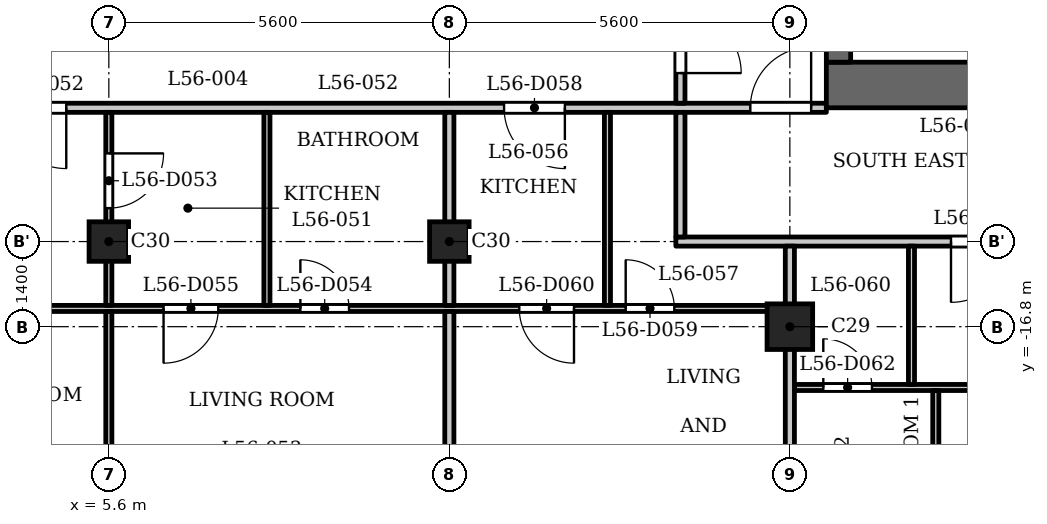
"""IFC4 building model, lengths in metres.
Left out: names, types, materials, properties, quantities, classifications, styles, units other than length and angle.
Written with IfcOpenShell. Run it as: python <this file> out.ifc"""

import sys

from ifc_helpers import new_model, si_unit, direction, frame, frame_2d, origin, origin_2d, place, context, subcontext, project, spatial, rectangle, extrude, element, fill, save


model = new_model("IFC4")
c1 = context("Model", 3, precision=1e-05, world=origin(), true_north=direction((0.0, 1.0)))
c2 = subcontext(c1, "Body", "Model", "MODEL_VIEW")
j1 = project(units=[si_unit("LENGTHUNIT", "METRE"), si_unit("PLANEANGLEUNIT", "RADIAN")], contexts=[c1])
p1 = place(None, origin())
s1 = spatial("IfcSite", under=j1, at=p1, CompositionType="ELEMENT")
p2 = place(p1, origin())
s2 = spatial("IfcBuilding", under=s1, at=p2, CompositionType="ELEMENT")
p3 = place(p2, frame((0.0, 0.0, 216.9)))
s3 = spatial("IfcBuildingStorey", under=s2, at=p3, CompositionType="ELEMENT", Elevation=216.9)
p4 = place(p3, frame((16.8, -16.8, 0.0), z_axis=(0.0, 0.0, 1.0), x_axis=(1.0, 0.0, 0.0)))
e1 = element("IfcColumn", 1, at=p4, inside=s3, PredefinedType="COLUMN", context=c2, shape_type="SweptSolid", body=[
    extrude(rectangle(XDim=0.75, YDim=0.75, at=origin_2d()), origin(), (0.0, 0.0, 1.0), 3.5),
])
for number, where, z_axis, x_axis in (
    (2, (5.6, -15.4, 0.0), (0.0, 0.0, 1.0), (1.0, 0.0, 0.0)),
    (3, (11.2, -15.4, 0.0), (0.0, 0.0, 1.0), (1.0, 0.0, 0.0)),
):
    element("IfcColumn", number, at=place(p3, frame(where, z_axis=z_axis, x_axis=x_axis)), inside=s3, PredefinedType="COLUMN", context=c2, shape_type="SweptSolid", body=[
        extrude(rectangle(XDim=0.65, YDim=0.65, at=origin_2d()), origin(), (0.0, 0.0, 1.0), 3.5),
    ])
p5 = place(p3, frame((17.4, -12.825, 0.0), z_axis=(0.0, 0.0, 1.0), x_axis=(1.0, 0.0, 0.0)))
e4 = element("IfcWall", 4, at=p5, inside=s3, PredefinedType="SHEAR", context=c2, shape_type="SweptSolid", body=[
    extrude(rectangle(XDim=7.6, YDim=0.75, at=frame_2d((3.8, 0.0))), origin(), (0.0, 0.0, 1.0), 3.2),
])
p6 = place(p3, frame((17.6, -12.45, 0.0), z_axis=(0.0, 0.0, 1.0), x_axis=(0.0, 1.0, 0.0)))
e5 = element("IfcWall", 5, at=p6, inside=s3, PredefinedType="SHEAR", context=c2, shape_type="SweptSolid", body=[
    extrude(rectangle(XDim=24.9, YDim=0.4, at=frame_2d((12.45, 0.0))), origin(), (0.0, 0.0, 1.0), 3.2),
])
p7 = place(p6, frame((6.85, 0.0, 0.0)))
e6 = element("IfcOpeningElement", 6, at=p7, cuts=e5, PredefinedType="OPENING", context=c2, shape_type="SweptSolid", body=[
    extrude(rectangle(XDim=0.9, YDim=2.1, at=frame_2d((0.45, 1.05))), frame((0.0, 0.21, 0.0), z_axis=(0.0, -1.0, 0.0), x_axis=(1.0, 0.0, 0.0)), (0.0, 0.0, 1.0), 0.42),
])
p8 = place(p6, frame((10.45, 0.0, 0.0)))
e7 = element("IfcOpeningElement", 7, at=p8, cuts=e5, PredefinedType="OPENING", context=c2, shape_type="SweptSolid", body=[
    extrude(rectangle(XDim=0.9, YDim=2.1, at=frame_2d((0.45, 1.05))), frame((0.0, 0.21, 0.0), z_axis=(0.0, -1.0, 0.0), x_axis=(1.0, 0.0, 0.0)), (0.0, 0.0, 1.0), 0.42),
])
p9 = place(p6, frame((15.6, 0.0, 0.0)))
e8 = element("IfcOpeningElement", 8, at=p9, cuts=e5, PredefinedType="OPENING", context=c2, shape_type="SweptSolid", body=[
    extrude(rectangle(XDim=1.1, YDim=2.1, at=frame_2d((0.55, 1.05))), frame((0.0, 0.21, 0.0), z_axis=(0.0, -1.0, 0.0), x_axis=(1.0, 0.0, 0.0)), (0.0, 0.0, 1.0), 0.42),
])
p10 = place(p6, frame((18.0, 0.0, 0.0)))
e9 = element("IfcOpeningElement", 9, at=p10, cuts=e5, PredefinedType="OPENING", context=c2, shape_type="SweptSolid", body=[
    extrude(rectangle(XDim=1.1, YDim=2.1, at=frame_2d((0.55, 1.05))), frame((0.0, 0.21, 0.0), z_axis=(0.0, -1.0, 0.0), x_axis=(1.0, 0.0, 0.0)), (0.0, 0.0, 1.0), 0.42),
])
p11 = place(p6, frame((23.025, 0.0, 0.0)))
e10 = element("IfcOpeningElement", 10, at=p11, cuts=e5, PredefinedType="OPENING", context=c2, shape_type="SweptSolid", body=[
    extrude(rectangle(XDim=1.1, YDim=2.1, at=frame_2d((0.55, 1.05))), frame((0.0, 0.21, 0.0), z_axis=(0.0, -1.0, 0.0), x_axis=(1.0, 0.0, 0.0)), (0.0, 0.0, 1.0), 0.42),
])
p12 = place(p6, frame((0.775, 0.0, 0.0)))
e11 = element("IfcOpeningElement", 11, at=p12, cuts=e5, PredefinedType="OPENING", context=c2, shape_type="SweptSolid", body=[
    extrude(rectangle(XDim=1.1, YDim=2.1, at=frame_2d((0.55, 1.05))), frame((0.0, 0.21, 0.0), z_axis=(0.0, -1.0, 0.0), x_axis=(1.0, 0.0, 0.0)), (0.0, 0.0, 1.0), 0.42),
])
p13 = place(p6, frame((12.925, 0.0, 0.0)))
e12 = element("IfcOpeningElement", 12, at=p13, cuts=e5, PredefinedType="OPENING", context=c2, shape_type="SweptSolid", body=[
    extrude(rectangle(XDim=1.8, YDim=2.1, at=frame_2d((0.9, 1.05))), frame((0.0, 0.21, 0.0), z_axis=(0.0, -1.0, 0.0), x_axis=(1.0, 0.0, 0.0)), (0.0, 0.0, 1.0), 0.42),
])
p14 = place(p3, frame((16.875, -17.8, 0.0), z_axis=(0.0, 0.0, 1.0), x_axis=(1.0, 0.0, 0.0)))
e13 = element("IfcWall", 13, at=p14, inside=s3, PredefinedType="PARTITIONING", context=c2, shape_type="SweptSolid", body=[
    extrude(rectangle(XDim=6.719, YDim=0.1, at=frame_2d((3.359, 0.0))), origin(), (0.0, 0.0, 1.0), 3.2),
])
p15 = place(p14, frame((0.475, 0.0, 0.0)))
e14 = element("IfcOpeningElement", 14, at=p15, cuts=e13, PredefinedType="OPENING", context=c2, shape_type="SweptSolid", body=[
    extrude(rectangle(XDim=0.8, YDim=2.1, at=frame_2d((0.4, 1.05))), frame((0.0, 0.06, 0.0), z_axis=(0.0, -1.0, 0.0), x_axis=(1.0, 0.0, 0.0)), (0.0, 0.0, 1.0), 0.12),
])
p16 = place(p14, frame((3.725, 0.0, 0.0)))
e15 = element("IfcOpeningElement", 15, at=p16, cuts=e13, PredefinedType="OPENING", context=c2, shape_type="SweptSolid", body=[
    extrude(rectangle(XDim=0.9, YDim=2.1, at=frame_2d((0.45, 1.05))), frame((0.0, 0.06, 0.0), z_axis=(0.0, -1.0, 0.0), x_axis=(1.0, 0.0, 0.0)), (0.0, 0.0, 1.0), 0.12),
])
p17 = place(p3, frame((-16.725, -16.5, 0.0), z_axis=(0.0, 0.0, 1.0), x_axis=(1.0, 0.0, 0.0)))
e16 = element("IfcWall", 16, at=p17, inside=s3, PredefinedType="PARTITIONING", context=c2, shape_type="SweptSolid", body=[
    extrude(rectangle(XDim=33.45, YDim=0.1, at=frame_2d((16.725, 0.0))), origin(), (0.0, 0.0, 1.0), 3.2),
])
p18 = place(p17, frame((0.675, 0.0, 0.0)))
e17 = element("IfcOpeningElement", 17, at=p18, cuts=e16, PredefinedType="OPENING", context=c2, shape_type="SweptSolid", body=[
    extrude(rectangle(XDim=0.8, YDim=2.1, at=frame_2d((0.4, 1.05))), frame((0.0, 0.06, 0.0), z_axis=(0.0, -1.0, 0.0), x_axis=(1.0, 0.0, 0.0)), (0.0, 0.0, 1.0), 0.12),
])
p19 = place(p17, frame((2.775, 0.0, 0.0)))
e18 = element("IfcOpeningElement", 18, at=p19, cuts=e16, PredefinedType="OPENING", context=c2, shape_type="SweptSolid", body=[
    extrude(rectangle(XDim=0.9, YDim=2.1, at=frame_2d((0.45, 1.05))), frame((0.0, 0.06, 0.0), z_axis=(0.0, -1.0, 0.0), x_axis=(1.0, 0.0, 0.0)), (0.0, 0.0, 1.0), 0.12),
])
p20 = place(p17, frame((6.425, 0.0, 0.0)))
e19 = element("IfcOpeningElement", 19, at=p20, cuts=e16, PredefinedType="OPENING", context=c2, shape_type="SweptSolid", body=[
    extrude(rectangle(XDim=0.8, YDim=2.1, at=frame_2d((0.4, 1.05))), frame((0.0, 0.06, 0.0), z_axis=(0.0, -1.0, 0.0), x_axis=(1.0, 0.0, 0.0)), (0.0, 0.0, 1.0), 0.12),
])
p21 = place(p17, frame((8.775, 0.0, 0.0)))
e20 = element("IfcOpeningElement", 20, at=p21, cuts=e16, PredefinedType="OPENING", context=c2, shape_type="SweptSolid", body=[
    extrude(rectangle(XDim=0.9, YDim=2.1, at=frame_2d((0.45, 1.05))), frame((0.0, 0.06, 0.0), z_axis=(0.0, -1.0, 0.0), x_axis=(1.0, 0.0, 0.0)), (0.0, 0.0, 1.0), 0.12),
])
p22 = place(p17, frame((12.525, 0.0, 0.0)))
e21 = element("IfcOpeningElement", 21, at=p22, cuts=e16, PredefinedType="OPENING", context=c2, shape_type="SweptSolid", body=[
    extrude(rectangle(XDim=0.9, YDim=2.1, at=frame_2d((0.45, 1.05))), frame((0.0, 0.06, 0.0), z_axis=(0.0, -1.0, 0.0), x_axis=(1.0, 0.0, 0.0)), (0.0, 0.0, 1.0), 0.12),
])
p23 = place(p17, frame((14.775, 0.0, 0.0)))
e22 = element("IfcOpeningElement", 22, at=p23, cuts=e16, PredefinedType="OPENING", context=c2, shape_type="SweptSolid", body=[
    extrude(rectangle(XDim=0.9, YDim=2.1, at=frame_2d((0.45, 1.05))), frame((0.0, 0.06, 0.0), z_axis=(0.0, -1.0, 0.0), x_axis=(1.0, 0.0, 0.0)), (0.0, 0.0, 1.0), 0.12),
])
p24 = place(p17, frame((25.475, 0.0, 0.0)))
e23 = element("IfcOpeningElement", 23, at=p24, cuts=e16, PredefinedType="OPENING", context=c2, shape_type="SweptSolid", body=[
    extrude(rectangle(XDim=0.8, YDim=2.1, at=frame_2d((0.4, 1.05))), frame((0.0, 0.06, 0.0), z_axis=(0.0, -1.0, 0.0), x_axis=(1.0, 0.0, 0.0)), (0.0, 0.0, 1.0), 0.12),
])
p25 = place(p17, frame((23.225, 0.0, 0.0)))
e24 = element("IfcOpeningElement", 24, at=p25, cuts=e16, PredefinedType="OPENING", context=c2, shape_type="SweptSolid", body=[
    extrude(rectangle(XDim=0.9, YDim=2.1, at=frame_2d((0.45, 1.05))), frame((0.0, 0.06, 0.0), z_axis=(0.0, -1.0, 0.0), x_axis=(1.0, 0.0, 0.0)), (0.0, 0.0, 1.0), 0.12),
])
p26 = place(p17, frame((17.875, 0.0, 0.0)))
e25 = element("IfcOpeningElement", 25, at=p26, cuts=e16, PredefinedType="OPENING", context=c2, shape_type="SweptSolid", body=[
    extrude(rectangle(XDim=0.9, YDim=2.1, at=frame_2d((0.45, 1.05))), frame((0.0, 0.06, 0.0), z_axis=(0.0, -1.0, 0.0), x_axis=(1.0, 0.0, 0.0)), (0.0, 0.0, 1.0), 0.12),
])
p27 = place(p17, frame((19.975, 0.0, 0.0)))
e26 = element("IfcOpeningElement", 26, at=p27, cuts=e16, PredefinedType="OPENING", context=c2, shape_type="SweptSolid", body=[
    extrude(rectangle(XDim=0.9, YDim=2.1, at=frame_2d((0.45, 1.05))), frame((0.0, 0.06, 0.0), z_axis=(0.0, -1.0, 0.0), x_axis=(1.0, 0.0, 0.0)), (0.0, 0.0, 1.0), 0.12),
])
p28 = place(p17, frame((30.825, 0.0, 0.0)))
e27 = element("IfcOpeningElement", 27, at=p28, cuts=e16, PredefinedType="OPENING", context=c2, shape_type="SweptSolid", body=[
    extrude(rectangle(XDim=0.8, YDim=2.1, at=frame_2d((0.4, 1.05))), frame((0.0, 0.06, 0.0), z_axis=(0.0, -1.0, 0.0), x_axis=(1.0, 0.0, 0.0)), (0.0, 0.0, 1.0), 0.12),
])
p29 = place(p17, frame((29.075, 0.0, 0.0)))
e28 = element("IfcOpeningElement", 28, at=p29, cuts=e16, PredefinedType="OPENING", context=c2, shape_type="SweptSolid", body=[
    extrude(rectangle(XDim=0.9, YDim=2.1, at=frame_2d((0.45, 1.05))), frame((0.0, 0.06, 0.0), z_axis=(0.0, -1.0, 0.0), x_axis=(1.0, 0.0, 0.0)), (0.0, 0.0, 1.0), 0.12),
])
p30 = place(p3, frame((14.925, -15.4, 0.0), z_axis=(0.0, 0.0, 1.0), x_axis=(1.0, 0.0, 0.0)))
e29 = element("IfcWall", 29, at=p30, inside=s3, PredefinedType="PARTITIONING", context=c2, shape_type="SweptSolid", body=[
    extrude(rectangle(XDim=9.759, YDim=0.15, at=frame_2d((4.879, 0.0))), origin(), (0.0, 0.0, 1.0), 3.2),
])
p31 = place(p30, frame((4.525, 0.0, 0.0)))
e30 = element("IfcOpeningElement", 30, at=p31, cuts=e29, PredefinedType="OPENING", context=c2, shape_type="SweptSolid", body=[
    extrude(rectangle(XDim=1.0, YDim=2.1, at=frame_2d((0.5, 1.05))), frame((0.0, 0.085, 0.0), z_axis=(0.0, -1.0, 0.0), x_axis=(1.0, 0.0, 0.0)), (0.0, 0.0, 1.0), 0.17),
])
p32 = place(p3, frame((-17.4, -13.2, 0.0), z_axis=(0.0, 0.0, 1.0), x_axis=(1.0, 0.0, 0.0)))
e31 = element("IfcWall", 31, at=p32, inside=s3, PredefinedType="PARTITIONING", context=c2, shape_type="SweptSolid", body=[
    extrude(rectangle(XDim=34.8, YDim=0.15, at=frame_2d((17.4, 0.0))), origin(), (0.0, 0.0, 1.0), 3.2),
])
p33 = place(p32, frame((0.15, 0.0, 0.0)))
e32 = element("IfcOpeningElement", 32, at=p33, cuts=e31, PredefinedType="OPENING", context=c2, shape_type="SweptSolid", body=[
    extrude(rectangle(XDim=1.0, YDim=2.1, at=frame_2d((0.5, 1.05))), frame((0.0, 0.085, 0.0), z_axis=(0.0, -1.0, 0.0), x_axis=(1.0, 0.0, 0.0)), (0.0, 0.0, 1.0), 0.17),
])
p34 = place(p32, frame((33.55, 0.0, 0.0)))
e33 = element("IfcOpeningElement", 33, at=p34, cuts=e31, PredefinedType="OPENING", context=c2, shape_type="SweptSolid", body=[
    extrude(rectangle(XDim=1.0, YDim=2.1, at=frame_2d((0.5, 1.05))), frame((0.0, 0.085, 0.0), z_axis=(0.0, -1.0, 0.0), x_axis=(1.0, 0.0, 0.0)), (0.0, 0.0, 1.0), 0.17),
])
p35 = place(p32, frame((3.7, 0.0, 0.0)))
e34 = element("IfcOpeningElement", 34, at=p35, cuts=e31, PredefinedType="OPENING", context=c2, shape_type="SweptSolid", body=[
    extrude(rectangle(XDim=1.0, YDim=2.1, at=frame_2d((0.5, 1.05))), frame((0.0, 0.085, 0.0), z_axis=(0.0, -1.0, 0.0), x_axis=(1.0, 0.0, 0.0)), (0.0, 0.0, 1.0), 0.17),
])
p36 = place(p32, frame((15.7, 0.0, 0.0)))
e35 = element("IfcOpeningElement", 35, at=p36, cuts=e31, PredefinedType="OPENING", context=c2, shape_type="SweptSolid", body=[
    extrude(rectangle(XDim=1.0, YDim=2.1, at=frame_2d((0.5, 1.05))), frame((0.0, 0.085, 0.0), z_axis=(0.0, -1.0, 0.0), x_axis=(1.0, 0.0, 0.0)), (0.0, 0.0, 1.0), 0.17),
])
p37 = place(p32, frame((21.3, 0.0, 0.0)))
e36 = element("IfcOpeningElement", 36, at=p37, cuts=e31, PredefinedType="OPENING", context=c2, shape_type="SweptSolid", body=[
    extrude(rectangle(XDim=1.0, YDim=2.1, at=frame_2d((0.5, 1.05))), frame((0.0, 0.085, 0.0), z_axis=(0.0, -1.0, 0.0), x_axis=(1.0, 0.0, 0.0)), (0.0, 0.0, 1.0), 0.17),
])
p38 = place(p32, frame((29.5, 0.0, 0.0)))
e37 = element("IfcOpeningElement", 37, at=p38, cuts=e31, PredefinedType="OPENING", context=c2, shape_type="SweptSolid", body=[
    extrude(rectangle(XDim=1.0, YDim=2.1, at=frame_2d((0.5, 1.05))), frame((0.0, 0.085, 0.0), z_axis=(0.0, -1.0, 0.0), x_axis=(1.0, 0.0, 0.0)), (0.0, 0.0, 1.0), 0.17),
])
p39 = place(p3, frame((5.6, -22.08, 0.0), z_axis=(0.0, 0.0, 1.0), x_axis=(0.0, 1.0, 0.0)))
e38 = element("IfcWall", 38, at=p39, inside=s3, PredefinedType="PARTITIONING", context=c2, shape_type="SweptSolid", body=[
    extrude(rectangle(XDim=5.53, YDim=0.1, at=frame_2d((2.765, 0.0))), origin(), (0.0, 0.0, 1.0), 3.2),
])
p40 = place(p3, frame((5.6, -16.45, 0.0), z_axis=(0.0, 0.0, 1.0), x_axis=(0.0, 1.0, 0.0)))
e39 = element("IfcWall", 39, at=p40, inside=s3, PredefinedType="PARTITIONING", context=c2, shape_type="SweptSolid", body=[
    extrude(rectangle(XDim=3.175, YDim=0.1, at=frame_2d((1.587, 0.0))), origin(), (0.0, 0.0, 1.0), 3.2),
])
p41 = place(p40, frame((1.6, 0.0, 0.0)))
e40 = element("IfcOpeningElement", 40, at=p41, cuts=e39, PredefinedType="OPENING", context=c2, shape_type="SweptSolid", body=[
    extrude(rectangle(XDim=0.9, YDim=2.1, at=frame_2d((0.45, 1.05))), frame((0.0, 0.06, 0.0), z_axis=(0.0, -1.0, 0.0), x_axis=(1.0, 0.0, 0.0)), (0.0, 0.0, 1.0), 0.12),
])
p42 = place(p3, frame((8.2, -16.45, 0.0), z_axis=(0.0, 0.0, 1.0), x_axis=(0.0, 1.0, 0.0)))
e41 = element("IfcWall", 41, at=p42, inside=s3, PredefinedType="PARTITIONING", context=c2, shape_type="SweptSolid", body=[
    extrude(rectangle(XDim=3.175, YDim=0.1, at=frame_2d((1.587, 0.0))), origin(), (0.0, 0.0, 1.0), 3.2),
])
p43 = place(p3, frame((11.2, -22.08, 0.0), z_axis=(0.0, 0.0, 1.0), x_axis=(0.0, 1.0, 0.0)))
e42 = element("IfcWall", 42, at=p43, inside=s3, PredefinedType="PARTITIONING", context=c2, shape_type="SweptSolid", body=[
    extrude(rectangle(XDim=5.53, YDim=0.15, at=frame_2d((2.765, 0.0))), origin(), (0.0, 0.0, 1.0), 3.2),
])
p44 = place(p3, frame((11.2, -16.45, 0.0), z_axis=(0.0, 0.0, 1.0), x_axis=(0.0, 1.0, 0.0)))
e43 = element("IfcWall", 43, at=p44, inside=s3, PredefinedType="PARTITIONING", context=c2, shape_type="SweptSolid", body=[
    extrude(rectangle(XDim=3.175, YDim=0.15, at=frame_2d((1.587, 0.0))), origin(), (0.0, 0.0, 1.0), 3.2),
])
p45 = place(p3, frame((13.8, -16.45, 0.0), z_axis=(0.0, 0.0, 1.0), x_axis=(0.0, 1.0, 0.0)))
e44 = element("IfcWall", 44, at=p45, inside=s3, PredefinedType="PARTITIONING", context=c2, shape_type="SweptSolid", body=[
    extrude(rectangle(XDim=3.175, YDim=0.1, at=frame_2d((1.587, 0.0))), origin(), (0.0, 0.0, 1.0), 3.2),
])
p46 = place(p3, frame((15.0, -15.325, 0.0), z_axis=(0.0, 0.0, 1.0), x_axis=(0.0, 1.0, 0.0)))
e45 = element("IfcWall", 45, at=p46, inside=s3, PredefinedType="PARTITIONING", context=c2, shape_type="SweptSolid", body=[
    extrude(rectangle(XDim=2.05, YDim=0.15, at=frame_2d((1.025, 0.0))), origin(), (0.0, 0.0, 1.0), 3.2),
])
p47 = place(p3, frame((15.0, -13.125, 0.0), z_axis=(0.0, 0.0, 1.0), x_axis=(0.0, 1.0, 0.0)))
e46 = element("IfcWall", 46, at=p47, inside=s3, PredefinedType="PARTITIONING", context=c2, shape_type="SweptSolid", body=[
    extrude(rectangle(XDim=6.356, YDim=0.15, at=frame_2d((3.178, 0.0))), origin(), (0.0, 0.0, 1.0), 3.2),
])
p48 = place(p47, frame((0.496, 0.0, 0.0)))
e47 = element("IfcOpeningElement", 47, at=p48, cuts=e46, PredefinedType="OPENING", context=c2, shape_type="SweptSolid", body=[
    extrude(rectangle(XDim=1.0, YDim=2.1, at=frame_2d((0.5, 1.05))), frame((0.0, 0.085, 0.0), z_axis=(0.0, -1.0, 0.0), x_axis=(1.0, 0.0, 0.0)), (0.0, 0.0, 1.0), 0.17),
])
p49 = place(p3, frame((16.8, -22.31, 0.0), z_axis=(0.0, 0.0, 1.0), x_axis=(0.0, 1.0, 0.0)))
e48 = element("IfcWall", 48, at=p49, inside=s3, PredefinedType="PARTITIONING", context=c2, shape_type="SweptSolid", body=[
    extrude(rectangle(XDim=6.835, YDim=0.15, at=frame_2d((3.417, 0.0))), origin(), (0.0, 0.0, 1.0), 2.55),
])
p50 = place(p3, frame((18.8, -17.75, 0.0), z_axis=(0.0, 0.0, 1.0), x_axis=(0.0, 1.0, 0.0)))
e49 = element("IfcWall", 49, at=p50, inside=s3, PredefinedType="PARTITIONING", context=c2, shape_type="SweptSolid", body=[
    extrude(rectangle(XDim=2.275, YDim=0.1, at=frame_2d((1.137, 0.0))), origin(), (0.0, 0.0, 1.0), 3.2),
])
p51 = place(p3, frame((19.2, -21.92, 0.0), z_axis=(0.0, 0.0, 1.0), x_axis=(0.0, 1.0, 0.0)))
e50 = element("IfcWall", 50, at=p51, inside=s3, PredefinedType="PARTITIONING", context=c2, shape_type="SweptSolid", body=[
    extrude(rectangle(XDim=4.07, YDim=0.1, at=frame_2d((2.035, 0.0))), origin(), (0.0, 0.0, 1.0), 3.2),
])
p52 = place(p51, frame((0.82, 0.0, 0.0)))
e51 = element("IfcOpeningElement", 51, at=p52, cuts=e50, PredefinedType="OPENING", context=c2, shape_type="SweptSolid", body=[
    extrude(rectangle(XDim=0.9, YDim=2.1, at=frame_2d((0.45, 1.05))), frame((0.0, 0.06, 0.0), z_axis=(0.0, -1.0, 0.0), x_axis=(1.0, 0.0, 0.0)), (0.0, 0.0, 1.0), 0.12),
])
p53 = place(p48, origin())
e52 = element("IfcDoor", 52, at=p53, inside=s3, OperationType="SINGLE_SWING_LEFT", PredefinedType="DOOR", context=c2, shape_type="SweptSolid", body=[
    extrude(rectangle(XDim=1.0, YDim=2.1, at=frame_2d((0.5, 1.05))), frame((0.0, 0.025, 0.0), z_axis=(0.0, -1.0, 0.0), x_axis=(1.0, 0.0, 0.0)), (0.0, 0.0, 1.0), 0.05),
])
fill(e47, e52)
p54 = place(p34, origin())
e53 = element("IfcDoor", 53, at=p54, inside=s3, OperationType="SINGLE_SWING_LEFT", PredefinedType="DOOR", context=c2, shape_type="SweptSolid", body=[
    extrude(rectangle(XDim=1.0, YDim=2.1, at=frame_2d((0.5, 1.05))), frame((0.0, 0.025, 0.0), z_axis=(0.0, -1.0, 0.0), x_axis=(1.0, 0.0, 0.0)), (0.0, 0.0, 1.0), 0.05),
])
fill(e33, e53)
p55 = place(p37, origin())
e54 = element("IfcDoor", 54, at=p55, inside=s3, OperationType="SINGLE_SWING_RIGHT", PredefinedType="DOOR", context=c2, shape_type="SweptSolid", body=[
    extrude(rectangle(XDim=1.0, YDim=2.1, at=frame_2d((0.5, 1.05))), frame((0.0, 0.025, 0.0), z_axis=(0.0, -1.0, 0.0), x_axis=(1.0, 0.0, 0.0)), (0.0, 0.0, 1.0), 0.05),
])
fill(e36, e54)
p56 = place(p41, origin())
e55 = element("IfcDoor", 55, at=p56, inside=s3, OperationType="SINGLE_SWING_RIGHT", PredefinedType="DOOR", context=c2, shape_type="SweptSolid", body=[
    extrude(rectangle(XDim=0.9, YDim=2.1, at=frame_2d((0.45, 1.05))), frame((0.0, 0.025, 0.0), z_axis=(0.0, -1.0, 0.0), x_axis=(1.0, 0.0, 0.0)), (0.0, 0.0, 1.0), 0.05),
])
fill(e40, e55)
p57 = place(p24, origin())
e56 = element("IfcDoor", 56, at=p57, inside=s3, OperationType="SINGLE_SWING_RIGHT", PredefinedType="DOOR", context=c2, shape_type="SweptSolid", body=[
    extrude(rectangle(XDim=0.8, YDim=2.1, at=frame_2d((0.4, 1.05))), frame((0.0, 0.025, 0.0), z_axis=(0.0, -1.0, 0.0), x_axis=(1.0, 0.0, 0.0)), (0.0, 0.0, 1.0), 0.05),
])
fill(e23, e56)
p58 = place(p25, origin())
e57 = element("IfcDoor", 57, at=p58, inside=s3, OperationType="SINGLE_SWING_LEFT", PredefinedType="DOOR", context=c2, shape_type="SweptSolid", body=[
    extrude(rectangle(XDim=0.9, YDim=2.1, at=frame_2d((0.45, 1.05))), frame((0.0, 0.025, 0.0), z_axis=(0.0, -1.0, 0.0), x_axis=(1.0, 0.0, 0.0)), (0.0, 0.0, 1.0), 0.05),
])
fill(e24, e57)
p59 = place(p38, origin())
e58 = element("IfcDoor", 58, at=p59, inside=s3, OperationType="SINGLE_SWING_RIGHT", PredefinedType="DOOR", context=c2, shape_type="SweptSolid", body=[
    extrude(rectangle(XDim=1.0, YDim=2.1, at=frame_2d((0.5, 1.05))), frame((0.0, 0.025, 0.0), z_axis=(0.0, -1.0, 0.0), x_axis=(1.0, 0.0, 0.0)), (0.0, 0.0, 1.0), 0.05),
])
fill(e37, e58)
p60 = place(p28, origin())
e59 = element("IfcDoor", 59, at=p60, inside=s3, OperationType="SINGLE_SWING_RIGHT", PredefinedType="DOOR", context=c2, shape_type="SweptSolid", body=[
    extrude(rectangle(XDim=0.8, YDim=2.1, at=frame_2d((0.4, 1.05))), frame((0.0, 0.025, 0.0), z_axis=(0.0, -1.0, 0.0), x_axis=(1.0, 0.0, 0.0)), (0.0, 0.0, 1.0), 0.05),
])
fill(e27, e59)
p61 = place(p29, origin())
e60 = element("IfcDoor", 60, at=p61, inside=s3, OperationType="SINGLE_SWING_RIGHT", PredefinedType="DOOR", context=c2, shape_type="SweptSolid", body=[
    extrude(rectangle(XDim=0.9, YDim=2.1, at=frame_2d((0.45, 1.05))), frame((0.0, 0.025, 0.0), z_axis=(0.0, -1.0, 0.0), x_axis=(1.0, 0.0, 0.0)), (0.0, 0.0, 1.0), 0.05),
])
fill(e28, e60)
p62 = place(p31, origin())
e61 = element("IfcDoor", 61, at=p62, inside=s3, OperationType="SINGLE_SWING_LEFT", PredefinedType="DOOR", context=c2, shape_type="SweptSolid", body=[
    extrude(rectangle(XDim=1.0, YDim=2.1, at=frame_2d((0.5, 1.05))), frame((0.0, 0.025, 0.0), z_axis=(0.0, -1.0, 0.0), x_axis=(1.0, 0.0, 0.0)), (0.0, 0.0, 1.0), 0.05),
])
fill(e30, e61)
p63 = place(p15, origin())
e62 = element("IfcDoor", 62, at=p63, inside=s3, OperationType="SINGLE_SWING_RIGHT", PredefinedType="DOOR", context=c2, shape_type="SweptSolid", body=[
    extrude(rectangle(XDim=0.8, YDim=2.1, at=frame_2d((0.4, 1.05))), frame((0.0, 0.025, 0.0), z_axis=(0.0, -1.0, 0.0), x_axis=(1.0, 0.0, 0.0)), (0.0, 0.0, 1.0), 0.05),
])
fill(e14, e62)
save(model, sys.argv[1])
